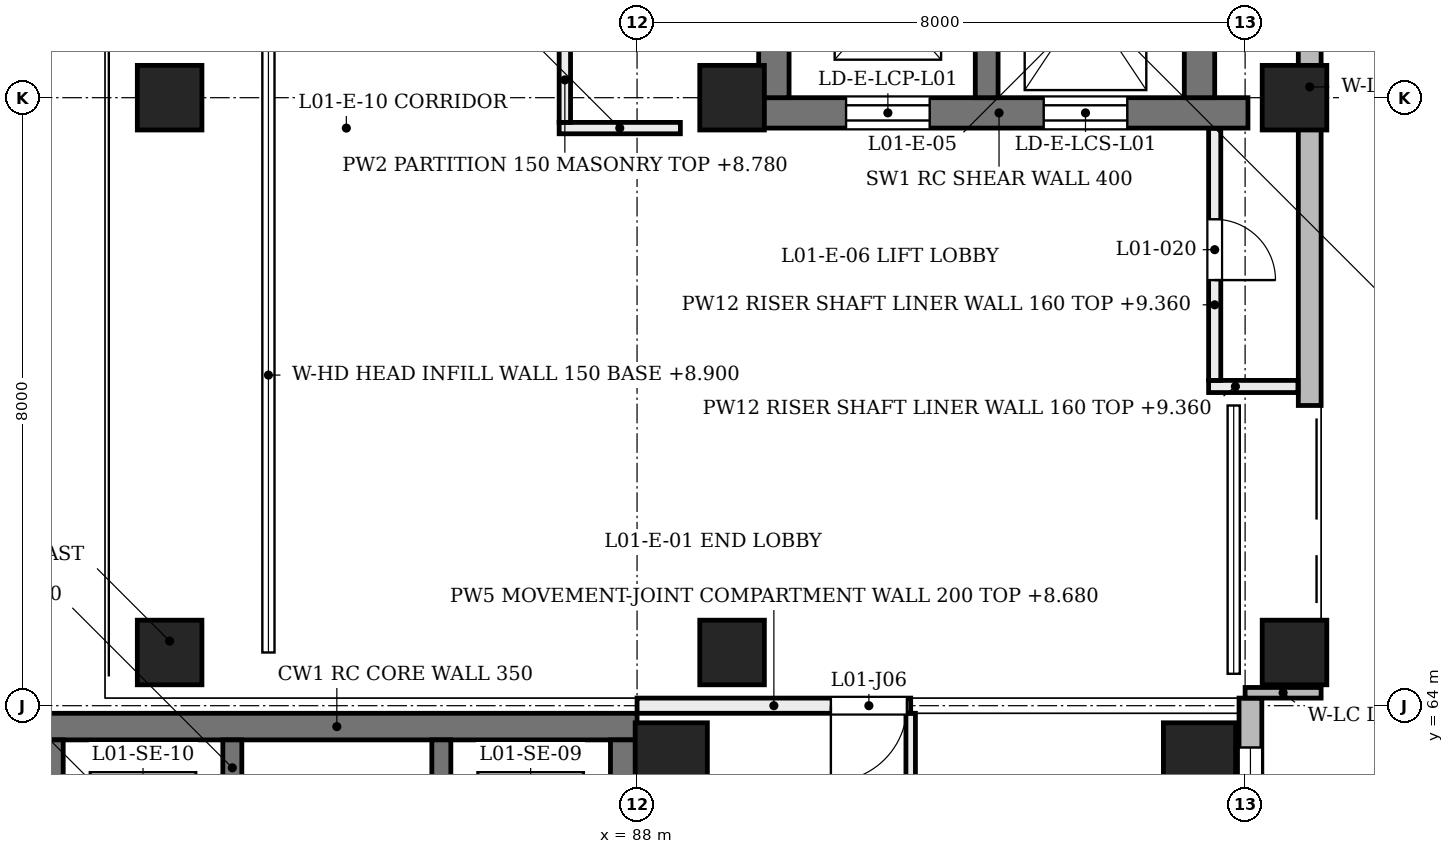
"""IFC4 building model, lengths in metres.
Left out: names, types, materials, properties, quantities, classifications, styles, units other than length and angle.
Written with IfcOpenShell. Run it as: python <this file> out.ifc"""

import sys

from ifc_helpers import new_model, si_unit, direction, frame, frame_2d, origin, origin_2d, place, context, subcontext, project, spatial, rectangle, extrude, element, fill, save


model = new_model("IFC4")
c1 = context("Model", 3, precision=1e-05, world=origin(), true_north=direction((0.0, 1.0)))
c2 = subcontext(c1, "Body", "Model", "MODEL_VIEW")
j1 = project(units=[si_unit("LENGTHUNIT", "METRE"), si_unit("PLANEANGLEUNIT", "RADIAN")], contexts=[c1])
p1 = place(None, origin())
s1 = spatial("IfcSite", under=j1, at=p1, CompositionType="ELEMENT")
p2 = place(p1, origin())
s2 = spatial("IfcBuilding", under=s1, at=p2, CompositionType="ELEMENT")
p3 = place(p2, frame((0.0, 0.0, 4.8)))
s3 = spatial("IfcBuildingStorey", under=s2, at=p3, CompositionType="ELEMENT", Elevation=4.8)
p4 = place(p3, frame((89.488, 71.8, 0.0), z_axis=(0.0, 0.0, 1.0), x_axis=(1.0, 0.0, 0.0)))
e1 = element("IfcWall", 1, at=p4, inside=s3, PredefinedType="SHEAR", context=c2, shape_type="SweptSolid", body=[
    extrude(rectangle(XDim=6.55, YDim=0.4, at=frame_2d((3.275, 0.0))), origin(), (0.0, 0.0, 1.0), 4.58),
])
p5 = place(p4, frame((1.262, 0.0, 0.0)))
e2 = element("IfcOpeningElement", 2, at=p5, cuts=e1, PredefinedType="OPENING", context=c2, shape_type="SweptSolid", body=[
    extrude(rectangle(XDim=1.1, YDim=2.1, at=frame_2d((0.55, 1.05))), frame((0.0, 0.21, 0.0), z_axis=(0.0, -1.0, 0.0), x_axis=(1.0, 0.0, 0.0)), (0.0, 0.0, 1.0), 0.42),
])
p6 = place(p4, frame((3.863, 0.0, 0.0)))
e3 = element("IfcOpeningElement", 3, at=p6, cuts=e1, PredefinedType="OPENING", context=c2, shape_type="SweptSolid", body=[
    extrude(rectangle(XDim=1.1, YDim=2.1, at=frame_2d((0.55, 1.05))), frame((0.0, 0.21, 0.0), z_axis=(0.0, -1.0, 0.0), x_axis=(1.0, 0.0, 0.0)), (0.0, 0.0, 1.0), 0.42),
])
for number, where, z_axis, x_axis in (
    (4, (89.8, 72.0, 0.0), (0.0, 0.0, 1.0), (0.0, 1.0, 0.0)),
    (5, (95.4, 72.0, 0.0), (0.0, 0.0, 1.0), (0.0, 1.0, 0.0)),
):
    element("IfcWall", number, at=place(p3, frame(where, z_axis=z_axis, x_axis=x_axis)), inside=s3, PredefinedType="SHEAR", context=c2, shape_type="SweptSolid", body=[
        extrude(rectangle(XDim=2.6, YDim=0.4, at=frame_2d((1.3, 0.0))), origin(), (0.0, 0.0, 1.0), 4.58),
    ])
p7 = place(p3, frame((92.6, 72.0, 0.0), z_axis=(0.0, 0.0, 1.0), x_axis=(0.0, 1.0, 0.0)))
e6 = element("IfcWall", 6, at=p7, inside=s3, PredefinedType="SHEAR", context=c2, shape_type="SweptSolid", body=[
    extrude(rectangle(XDim=2.6, YDim=0.3, at=frame_2d((1.3, 0.0))), origin(), (0.0, 0.0, 1.0), 4.58),
])
p8 = place(p3, frame((80.1, 63.725, 0.0), z_axis=(0.0, 0.0, 1.0), x_axis=(1.0, 0.0, 0.0)))
e7 = element("IfcWall", 7, at=p8, inside=s3, PredefinedType="SHEAR", context=c2, shape_type="SweptSolid", body=[
    extrude(rectangle(XDim=7.9, YDim=0.35, at=frame_2d((3.95, 0.0))), origin(), (0.0, 0.0, 1.0), 4.58),
])
p9 = place(p3, frame((80.275, 48.35, 0.0), z_axis=(0.0, 0.0, 1.0), x_axis=(0.0, 1.0, 0.0)))
e8 = element("IfcWall", 8, at=p9, inside=s3, PredefinedType="SHEAR", context=c2, shape_type="SweptSolid", body=[
    extrude(rectangle(XDim=15.2, YDim=0.35, at=frame_2d((7.6, 0.0))), origin(), (0.0, 0.0, 1.0), 4.58),
])
p10 = place(p9, frame((0.95, 0.0, 0.0)))
e9 = element("IfcOpeningElement", 9, at=p10, cuts=e8, PredefinedType="OPENING", context=c2, shape_type="SweptSolid", body=[
    extrude(rectangle(XDim=1.0, YDim=2.1, at=frame_2d((0.5, 1.05))), frame((0.0, 0.185, 0.0), z_axis=(0.0, -1.0, 0.0), x_axis=(1.0, 0.0, 0.0)), (0.0, 0.0, 1.0), 0.37),
])
p11 = place(p9, frame((10.6, 0.0, 0.0)))
e10 = element("IfcOpeningElement", 10, at=p11, cuts=e8, PredefinedType="OPENING", context=c2, shape_type="SweptSolid", body=[
    extrude(rectangle(XDim=1.4, YDim=2.1, at=frame_2d((0.7, 1.05))), frame((0.0, 0.185, 0.0), z_axis=(0.0, -1.0, 0.0), x_axis=(1.0, 0.0, 0.0)), (0.0, 0.0, 1.0), 0.37),
])
p12 = place(p3, frame((87.825, 48.35, 0.0), z_axis=(0.0, 0.0, 1.0), x_axis=(0.0, 1.0, 0.0)))
e11 = element("IfcWall", 11, at=p12, inside=s3, PredefinedType="SHEAR", context=c2, shape_type="SweptSolid", body=[
    extrude(rectangle(XDim=15.2, YDim=0.35, at=frame_2d((7.6, 0.0))), origin(), (0.0, 0.0, 1.0), 4.58),
])
p13 = place(p12, frame((0.95, 0.0, 0.0)))
e12 = element("IfcOpeningElement", 12, at=p13, cuts=e11, PredefinedType="OPENING", context=c2, shape_type="SweptSolid", body=[
    extrude(rectangle(XDim=1.0, YDim=2.1, at=frame_2d((0.5, 1.05))), frame((0.0, 0.185, 0.0), z_axis=(0.0, -1.0, 0.0), x_axis=(1.0, 0.0, 0.0)), (0.0, 0.0, 1.0), 0.37),
])
p14 = place(p12, frame((10.6, 0.0, 0.0)))
e13 = element("IfcOpeningElement", 13, at=p14, cuts=e11, PredefinedType="OPENING", context=c2, shape_type="SweptSolid", body=[
    extrude(rectangle(XDim=1.4, YDim=2.1, at=frame_2d((0.7, 1.05))), frame((0.0, 0.185, 0.0), z_axis=(0.0, -1.0, 0.0), x_axis=(1.0, 0.0, 0.0)), (0.0, 0.0, 1.0), 0.37),
])
for number, where, z_axis, x_axis in (
    (14, (88.45, 63.3, 0.0), (0.0, 0.0, 1.0), (1.0, 0.0, 0.0)),
    (15, (95.4, 63.3, 0.0), (0.0, 0.0, 1.0), (1.0, 0.0, 0.0)),
):
    element("IfcColumn", number, at=place(p3, frame(where, z_axis=z_axis, x_axis=x_axis)), inside=s3, PredefinedType="COLUMN", context=c2, shape_type="SweptSolid", body=[
        extrude(rectangle(XDim=0.95, YDim=0.95, at=origin_2d()), origin(), (0.0, 0.0, 1.0), 4.8),
    ])
for number, where, z_axis, x_axis in (
    (16, (81.6, 64.7, 0.0), (0.204, 0.0, 0.979), (0.0, 1.0, 0.0)),
    (17, (81.6, 72.0, 0.0), (0.204, 0.0, 0.979), (0.0, 1.0, 0.0)),
    (18, (89.0, 64.7, 0.0), (0.204, 0.0, 0.979), (0.0, 1.0, 0.0)),
    (19, (89.0, 72.0, 0.0), (0.204, 0.0, 0.979), (0.0, 1.0, 0.0)),
    (20, (96.4, 64.7, 0.0), (0.204, 0.0, 0.979), (0.0, 1.0, 0.0)),
    (21, (96.4, 72.0, 0.0), (0.204, 0.0, 0.979), (0.0, 1.0, 0.0)),
):
    element("IfcColumn", number, at=place(p3, frame(where, z_axis=z_axis, x_axis=x_axis)), inside=s3, PredefinedType="COLUMN", context=c2, shape_type="SweptSolid", body=[
        extrude(rectangle(XDim=0.85, YDim=0.85, at=origin_2d()), origin(), (0.0, 0.0, 1.0), 4.903),
    ])
p15 = place(p3, frame((96.85, 67.95, 0.0), z_axis=(0.0, 0.0, 1.0), x_axis=(0.0, 1.0, 0.0)))
e22 = element("IfcWall", 22, at=p15, inside=s3, PredefinedType="SOLIDWALL", context=c2, shape_type="SweptSolid", body=[
    extrude(rectangle(XDim=24.1, YDim=0.3, at=frame_2d((12.05, 0.0))), origin(), (0.0, 0.0, 1.0), 3.9),
])
p16 = place(p3, frame((83.15, 64.9, 4.1), z_axis=(0.0, 0.0, 1.0), x_axis=(0.0, 1.0, 0.0)))
e23 = element("IfcWall", 23, at=p16, inside=s3, PredefinedType="SOLIDWALL", context=c2, shape_type="SweptSolid", body=[
    extrude(rectangle(XDim=6.9, YDim=0.15, at=frame_2d((3.45, 0.0))), origin(), (0.0, 0.0, 1.0), 0.48),
])
p17 = place(p3, frame((83.15, 72.2, 4.1), z_axis=(0.0, 0.0, 1.0), x_axis=(0.0, 1.0, 0.0)))
e24 = element("IfcWall", 24, at=p17, inside=s3, PredefinedType="SOLIDWALL", context=c2, shape_type="SweptSolid", body=[
    extrude(rectangle(XDim=7.6, YDim=0.15, at=frame_2d((3.8, 0.0))), origin(), (0.0, 0.0, 1.0), 0.48),
])
p18 = place(p3, frame((96.07, 47.7, 0.0), z_axis=(0.0, 0.0, 1.0), x_axis=(0.0, 1.0, 0.0)))
e25 = element("IfcWall", 25, at=p18, inside=s3, PredefinedType="SOLIDWALL", context=c2, shape_type="SweptSolid", body=[
    extrude(rectangle(XDim=16.4, YDim=0.3, at=frame_2d((8.2, 0.0))), origin(), (0.0, 0.0, 1.0), 3.9),
])
p19 = place(p18, frame((0.45, 0.0, 0.75)))
e26 = element("IfcOpeningElement", 26, at=p19, cuts=e25, PredefinedType="OPENING", context=c2, shape_type="SweptSolid", body=[
    extrude(rectangle(XDim=1.8, YDim=3.1, at=frame_2d((0.9, 1.55))), frame((0.0, 0.16, 0.0), z_axis=(0.0, -1.0, 0.0), x_axis=(1.0, 0.0, 0.0)), (0.0, 0.0, 1.0), 0.32),
])
p20 = place(p18, frame((3.15, 0.0, 0.75)))
e27 = element("IfcOpeningElement", 27, at=p20, cuts=e25, PredefinedType="OPENING", context=c2, shape_type="SweptSolid", body=[
    extrude(rectangle(XDim=1.8, YDim=3.1, at=frame_2d((0.9, 1.55))), frame((0.0, 0.16, 0.0), z_axis=(0.0, -1.0, 0.0), x_axis=(1.0, 0.0, 0.0)), (0.0, 0.0, 1.0), 0.32),
])
p21 = place(p18, frame((5.85, 0.0, 0.75)))
e28 = element("IfcOpeningElement", 28, at=p21, cuts=e25, PredefinedType="OPENING", context=c2, shape_type="SweptSolid", body=[
    extrude(rectangle(XDim=1.8, YDim=3.1, at=frame_2d((0.9, 1.55))), frame((0.0, 0.16, 0.0), z_axis=(0.0, -1.0, 0.0), x_axis=(1.0, 0.0, 0.0)), (0.0, 0.0, 1.0), 0.32),
])
p22 = place(p18, frame((8.55, 0.0, 0.75)))
e29 = element("IfcOpeningElement", 29, at=p22, cuts=e25, PredefinedType="OPENING", context=c2, shape_type="SweptSolid", body=[
    extrude(rectangle(XDim=1.8, YDim=3.1, at=frame_2d((0.9, 1.55))), frame((0.0, 0.16, 0.0), z_axis=(0.0, -1.0, 0.0), x_axis=(1.0, 0.0, 0.0)), (0.0, 0.0, 1.0), 0.32),
])
p23 = place(p18, frame((11.25, 0.0, 0.75)))
e30 = element("IfcOpeningElement", 30, at=p23, cuts=e25, PredefinedType="OPENING", context=c2, shape_type="SweptSolid", body=[
    extrude(rectangle(XDim=1.8, YDim=3.1, at=frame_2d((0.9, 1.55))), frame((0.0, 0.16, 0.0), z_axis=(0.0, -1.0, 0.0), x_axis=(1.0, 0.0, 0.0)), (0.0, 0.0, 1.0), 0.32),
])
p24 = place(p18, frame((13.95, 0.0, 0.75)))
e31 = element("IfcOpeningElement", 31, at=p24, cuts=e25, PredefinedType="OPENING", context=c2, shape_type="SweptSolid", body=[
    extrude(rectangle(XDim=1.8, YDim=3.1, at=frame_2d((0.9, 1.55))), frame((0.0, 0.16, 0.0), z_axis=(0.0, -1.0, 0.0), x_axis=(1.0, 0.0, 0.0)), (0.0, 0.0, 1.0), 0.32),
])
p25 = place(p3, frame((96.0, 64.17, 0.0), z_axis=(0.0, 0.0, 1.0), x_axis=(1.0, 0.0, 0.0)))
e32 = element("IfcWall", 32, at=p25, inside=s3, PredefinedType="SOLIDWALL", context=c2, shape_type="SweptSolid", body=[
    extrude(rectangle(XDim=1.0, YDim=0.14, at=frame_2d((0.5, 0.0))), origin(), (0.0, 0.0, 1.0), 3.9),
])
for number, where, z_axis, x_axis in (
    (33, (85.425, 61.1, 0.0), (0.0, 0.0, 1.0), (0.0, 1.0, 0.0)),
    (34, (82.675, 61.1, 0.0), (0.0, 0.0, 1.0), (0.0, 1.0, 0.0)),
):
    element("IfcWall", number, at=place(p3, frame(where, z_axis=z_axis, x_axis=x_axis)), inside=s3, PredefinedType="SOLIDWALL", context=c2, shape_type="SweptSolid", body=[
        extrude(rectangle(XDim=2.45, YDim=0.25, at=frame_2d((1.225, 0.0))), origin(), (0.0, 0.0, 1.0), 4.55),
    ])
p26 = place(p3, frame((95.52, 68.2, 0.0), z_axis=(0.0, 0.0, 1.0), x_axis=(1.0, 0.0, 0.0)))
e35 = element("IfcWall", 35, at=p26, inside=s3, PredefinedType="PARTITIONING", context=c2, shape_type="SweptSolid", body=[
    extrude(rectangle(XDim=1.175, YDim=0.16, at=frame_2d((0.587, 0.0))), origin(), (0.0, 0.0, 1.0), 4.56),
])
p27 = place(p3, frame((86.975, 71.6, 0.0), z_axis=(0.0, 0.0, 1.0), x_axis=(1.0, 0.0, 0.0)))
e36 = element("IfcWall", 36, at=p27, inside=s3, PredefinedType="PARTITIONING", context=c2, shape_type="SweptSolid", body=[
    extrude(rectangle(XDim=1.595, YDim=0.15, at=frame_2d((0.797, 0.0))), origin(), (0.0, 0.0, 1.0), 4.56),
])
p28 = place(p3, frame((95.6, 68.28, 0.0), z_axis=(0.0, 0.0, 1.0), x_axis=(0.0, 1.0, 0.0)))
e37 = element("IfcWall", 37, at=p28, inside=s3, PredefinedType="PARTITIONING", context=c2, shape_type="SweptSolid", body=[
    extrude(rectangle(XDim=3.315, YDim=0.16, at=frame_2d((1.657, 0.0))), origin(), (0.0, 0.0, 1.0), 4.56),
])
p29 = place(p28, frame((1.32, 0.0, 0.0)))
e38 = element("IfcOpeningElement", 38, at=p29, cuts=e37, PredefinedType="OPENING", context=c2, shape_type="SweptSolid", body=[
    extrude(rectangle(XDim=0.8, YDim=2.1, at=frame_2d((0.4, 1.05))), frame((0.0, 0.09, 0.0), z_axis=(0.0, -1.0, 0.0), x_axis=(1.0, 0.0, 0.0)), (0.0, 0.0, 1.0), 0.18),
])
p30 = place(p3, frame((87.05, 71.675, 0.0), z_axis=(0.0, 0.0, 1.0), x_axis=(0.0, 1.0, 0.0)))
e39 = element("IfcWall", 39, at=p30, inside=s3, PredefinedType="PARTITIONING", context=c2, shape_type="SweptSolid", body=[
    extrude(rectangle(XDim=3.725, YDim=0.15, at=frame_2d((1.862, 0.0))), origin(), (0.0, 0.0, 1.0), 3.98),
])
p31 = place(p30, frame((1.15, 0.0, 0.0)))
e40 = element("IfcOpeningElement", 40, at=p31, cuts=e39, PredefinedType="OPENING", context=c2, shape_type="SweptSolid", body=[
    extrude(rectangle(XDim=0.95, YDim=2.1, at=frame_2d((0.475, 1.05))), frame((0.0, 0.085, 0.0), z_axis=(0.0, -1.0, 0.0), x_axis=(1.0, 0.0, 0.0)), (0.0, 0.0, 1.0), 0.17),
])
p32 = place(p3, frame((91.6, 53.677, 0.0), z_axis=(0.0, 0.0, 1.0), x_axis=(0.0, 1.0, 0.0)))
e41 = element("IfcWall", 41, at=p32, inside=s3, PredefinedType="PARTITIONING", context=c2, shape_type="SweptSolid", body=[
    extrude(rectangle(XDim=10.223, YDim=0.125, at=frame_2d((5.112, 0.0))), origin(), (0.0, 0.0, 1.0), 3.88),
])
p33 = place(p32, frame((8.059, 0.0, 0.0)))
e42 = element("IfcOpeningElement", 42, at=p33, cuts=e41, PredefinedType="OPENING", context=c2, shape_type="SweptSolid", body=[
    extrude(rectangle(XDim=0.9, YDim=2.1, at=frame_2d((0.45, 1.05))), frame((0.0, 0.073, 0.0), z_axis=(0.0, -1.0, 0.0), x_axis=(1.0, 0.0, 0.0)), (0.0, 0.0, 1.0), 0.145),
])
p34 = place(p3, frame((88.0, 64.0, 0.0), z_axis=(0.0, 0.0, 1.0), x_axis=(1.0, 0.0, 0.0)))
e43 = element("IfcWall", 43, at=p34, inside=s3, PredefinedType="PARTITIONING", context=c2, shape_type="SweptSolid", body=[
    extrude(rectangle(XDim=3.6, YDim=0.2, at=frame_2d((1.8, 0.0))), origin(), (0.0, 0.0, 1.0), 3.88),
])
p35 = place(p34, frame((2.55, 0.0, 0.0)))
e44 = element("IfcOpeningElement", 44, at=p35, cuts=e43, PredefinedType="OPENING", context=c2, shape_type="SweptSolid", body=[
    extrude(rectangle(XDim=1.0, YDim=2.1, at=frame_2d((0.5, 1.05))), frame((0.0, 0.11, 0.0), z_axis=(0.0, -1.0, 0.0), x_axis=(1.0, 0.0, 0.0)), (0.0, 0.0, 1.0), 0.22),
])
p36 = place(p24, origin())
e45 = element("IfcWindow", 45, at=p36, inside=s3, PartitioningType="SINGLE_PANEL", PredefinedType="WINDOW", context=c2, shape_type="SweptSolid", body=[
    extrude(rectangle(XDim=1.8, YDim=3.1, at=frame_2d((0.9, 1.55))), frame((0.0, 0.03, 0.0), z_axis=(0.0, -1.0, 0.0), x_axis=(1.0, 0.0, 0.0)), (0.0, 0.0, 1.0), 0.06),
])
fill(e31, e45)
p37 = place(p5, frame((1.1, 0.0, 0.0), z_axis=(0.0, 0.0, 1.0), x_axis=(-1.0, 0.0, 0.0)))
e46 = element("IfcDoor", 46, at=p37, inside=s3, OperationType="DOUBLE_DOOR_SLIDING", PredefinedType="DOOR", context=c2, shape_type="SweptSolid", body=[
    extrude(rectangle(XDim=1.1, YDim=2.1, at=frame_2d((0.55, 1.05))), frame((0.0, 0.025, 0.0), z_axis=(0.0, -1.0, 0.0), x_axis=(1.0, 0.0, 0.0)), (0.0, 0.0, 1.0), 0.05),
])
fill(e2, e46)
p38 = place(p6, frame((1.1, 0.0, 0.0), z_axis=(0.0, 0.0, 1.0), x_axis=(-1.0, 0.0, 0.0)))
e47 = element("IfcDoor", 47, at=p38, inside=s3, OperationType="DOUBLE_DOOR_SLIDING", PredefinedType="DOOR", context=c2, shape_type="SweptSolid", body=[
    extrude(rectangle(XDim=1.1, YDim=2.1, at=frame_2d((0.55, 1.05))), frame((0.0, 0.025, 0.0), z_axis=(0.0, -1.0, 0.0), x_axis=(1.0, 0.0, 0.0)), (0.0, 0.0, 1.0), 0.05),
])
fill(e3, e47)
p39 = place(p29, frame((0.8, 0.0, 0.0), z_axis=(0.0, 0.0, 1.0), x_axis=(-1.0, 0.0, 0.0)))
e48 = element("IfcDoor", 48, at=p39, inside=s3, OperationType="SINGLE_SWING_LEFT", PredefinedType="DOOR", context=c2, shape_type="SweptSolid", body=[
    extrude(rectangle(XDim=0.8, YDim=2.1, at=frame_2d((0.4, 1.05))), frame((0.0, 0.025, 0.0), z_axis=(0.0, -1.0, 0.0), x_axis=(1.0, 0.0, 0.0)), (0.0, 0.0, 1.0), 0.05),
])
fill(e38, e48)
p40 = place(p35, frame((1.0, 0.0, 0.0), z_axis=(0.0, 0.0, 1.0), x_axis=(-1.0, 0.0, 0.0)))
e49 = element("IfcDoor", 49, at=p40, inside=s3, OperationType="SINGLE_SWING_LEFT", PredefinedType="DOOR", context=c2, shape_type="SweptSolid", body=[
    extrude(rectangle(XDim=1.0, YDim=2.1, at=frame_2d((0.5, 1.05))), frame((0.0, 0.025, 0.0), z_axis=(0.0, -1.0, 0.0), x_axis=(1.0, 0.0, 0.0)), (0.0, 0.0, 1.0), 0.05),
])
fill(e44, e49)
save(model, sys.argv[1])
